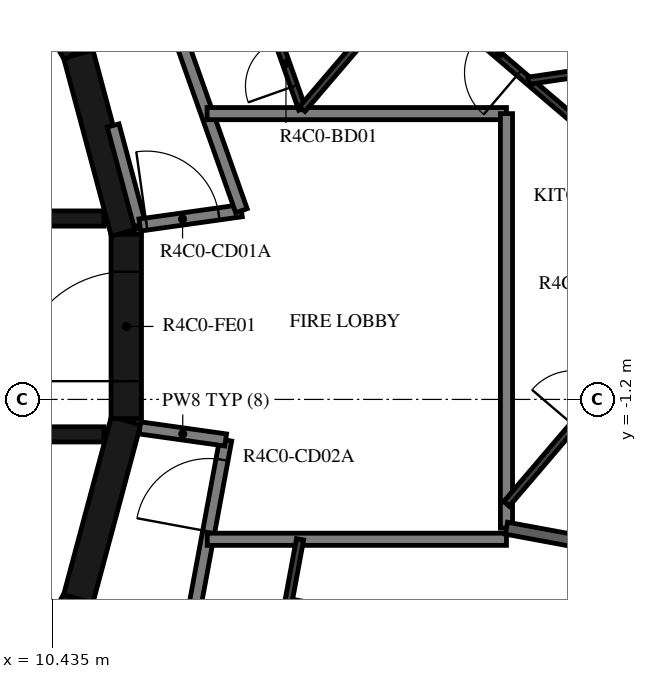
"""IFC4 building model, lengths in metres.
Left out: names, types, materials, properties, quantities, classifications, styles, units other than length and angle.
Written with IfcOpenShell. Run it as: python <this file> out.ifc"""

import sys

from ifc_helpers import new_model, si_unit, direction, frame, frame_2d, origin, place, context, subcontext, project, spatial, rectangle, extrude, element, fill, save


model = new_model("IFC4")
c1 = context("Model", 3, precision=1e-05, world=origin(), true_north=direction((0.0, 1.0)))
c2 = subcontext(c1, "Body", "Model", "MODEL_VIEW")
j1 = project(units=[si_unit("LENGTHUNIT", "METRE"), si_unit("PLANEANGLEUNIT", "RADIAN")], contexts=[c1])
p1 = place(None, origin())
s1 = spatial("IfcSite", under=j1, at=p1, CompositionType="ELEMENT")
p2 = place(p1, origin())
s2 = spatial("IfcBuilding", under=s1, at=p2, CompositionType="ELEMENT")
p3 = place(p2, frame((0.0, 0.0, 179.7)))
s3 = spatial("IfcBuildingStorey", under=s2, at=p3, CompositionType="ELEMENT", Elevation=179.7)
for number, where, z_axis, x_axis in (
    (1, (9.329, -7.137, 0.0), (0.0, 0.0, 1.0), (0.5, 0.866, 0.0)),
    (2, (10.858, -4.479, 0.0), (0.0, 0.0, 1.0), (0.259, 0.966, 0.0)),
):
    element("IfcWall", number, at=place(p3, frame(where, z_axis=z_axis, x_axis=x_axis)), inside=s3, PredefinedType="SHEAR", context=c2, shape_type="SweptSolid", body=[
        extrude(rectangle(XDim=3.033, YDim=0.5, at=frame_2d((1.516, 0.0))), origin(), (0.0, 0.0, 1.0), 3.05),
    ])
p4 = place(p3, frame((11.647, -1.516, 0.0), z_axis=(0.0, 0.0, 1.0), x_axis=(0.0, 1.0, 0.0)))
e3 = element("IfcWall", 3, at=p4, inside=s3, PredefinedType="SHEAR", context=c2, shape_type="SweptSolid", body=[
    extrude(rectangle(XDim=3.033, YDim=0.5, at=frame_2d((1.516, 0.0))), origin(), (0.0, 0.0, 1.0), 3.05),
])
p5 = place(p4, frame((0.616, 0.0, 0.0)))
e4 = element("IfcOpeningElement", 4, at=p5, cuts=e3, PredefinedType="OPENING", context=c2, shape_type="SweptSolid", body=[
    extrude(rectangle(XDim=1.8, YDim=2.1, at=frame_2d((0.9, 1.05))), frame((0.0, 0.26, 0.0), z_axis=(0.0, -1.0, 0.0), x_axis=(1.0, 0.0, 0.0)), (0.0, 0.0, 1.0), 0.52),
])
for number, where, z_axis, x_axis in (
    (5, (11.643, 1.55, 0.0), (0.0, 0.0, 1.0), (-0.259, 0.966, 0.0)),
    (6, (10.845, 4.51, 0.0), (0.0, 0.0, 1.0), (-0.5, 0.866, 0.0)),
):
    element("IfcWall", number, at=place(p3, frame(where, z_axis=z_axis, x_axis=x_axis)), inside=s3, PredefinedType="SHEAR", context=c2, shape_type="SweptSolid", body=[
        extrude(rectangle(XDim=3.033, YDim=0.5, at=frame_2d((1.516, 0.0))), origin(), (0.0, 0.0, 1.0), 3.05),
    ])
p6 = place(p3, frame((3.35, 1.775, 0.0), z_axis=(0.0, 0.0, 1.0), x_axis=(1.0, 0.0, 0.0)))
e7 = element("IfcWall", 7, at=p6, inside=s3, PredefinedType="SHEAR", context=c2, shape_type="SweptSolid", body=[
    extrude(rectangle(XDim=7.93, YDim=0.25, at=frame_2d((3.965, 0.0))), origin(), (0.0, 0.0, 1.0), 3.05),
])
p7 = place(p6, frame((0.35, 0.0, 0.0)))
e8 = element("IfcOpeningElement", 8, at=p7, cuts=e7, PredefinedType="OPENING", context=c2, shape_type="SweptSolid", body=[
    extrude(rectangle(XDim=1.2, YDim=2.4, at=frame_2d((0.6, 1.2))), frame((0.0, 0.135, 0.0), z_axis=(0.0, -1.0, 0.0), x_axis=(1.0, 0.0, 0.0)), (0.0, 0.0, 1.0), 0.27),
])
p8 = place(p6, frame((2.5, 0.0, 0.0)))
e9 = element("IfcOpeningElement", 9, at=p8, cuts=e7, PredefinedType="OPENING", context=c2, shape_type="SweptSolid", body=[
    extrude(rectangle(XDim=1.2, YDim=2.4, at=frame_2d((0.6, 1.2))), frame((0.0, 0.135, 0.0), z_axis=(0.0, -1.0, 0.0), x_axis=(1.0, 0.0, 0.0)), (0.0, 0.0, 1.0), 0.27),
])
p9 = place(p6, frame((4.8, 0.0, 0.0)))
e10 = element("IfcOpeningElement", 10, at=p9, cuts=e7, PredefinedType="OPENING", context=c2, shape_type="SweptSolid", body=[
    extrude(rectangle(XDim=0.9, YDim=2.1, at=frame_2d((0.45, 1.05))), frame((0.0, 0.135, 0.0), z_axis=(0.0, -1.0, 0.0), x_axis=(1.0, 0.0, 0.0)), (0.0, 0.0, 1.0), 0.27),
])
p10 = place(p3, frame((3.35, -1.775, 0.0), z_axis=(0.0, 0.0, 1.0), x_axis=(1.0, 0.0, 0.0)))
e11 = element("IfcWall", 11, at=p10, inside=s3, PredefinedType="SHEAR", context=c2, shape_type="SweptSolid", body=[
    extrude(rectangle(XDim=7.93, YDim=0.25, at=frame_2d((3.965, 0.0))), origin(), (0.0, 0.0, 1.0), 3.05),
])
p11 = place(p10, frame((0.4, 0.0, 0.0)))
e12 = element("IfcOpeningElement", 12, at=p11, cuts=e11, PredefinedType="OPENING", context=c2, shape_type="SweptSolid", body=[
    extrude(rectangle(XDim=1.1, YDim=2.4, at=frame_2d((0.55, 1.2))), frame((0.0, 0.135, 0.0), z_axis=(0.0, -1.0, 0.0), x_axis=(1.0, 0.0, 0.0)), (0.0, 0.0, 1.0), 0.27),
])
p12 = place(p10, frame((2.55, 0.0, 0.0)))
e13 = element("IfcOpeningElement", 13, at=p12, cuts=e11, PredefinedType="OPENING", context=c2, shape_type="SweptSolid", body=[
    extrude(rectangle(XDim=1.1, YDim=2.4, at=frame_2d((0.55, 1.2))), frame((0.0, 0.135, 0.0), z_axis=(0.0, -1.0, 0.0), x_axis=(1.0, 0.0, 0.0)), (0.0, 0.0, 1.0), 0.27),
])
p13 = place(p10, frame((4.7, 0.0, 0.0)))
e14 = element("IfcOpeningElement", 14, at=p13, cuts=e11, PredefinedType="OPENING", context=c2, shape_type="SweptSolid", body=[
    extrude(rectangle(XDim=1.1, YDim=2.4, at=frame_2d((0.55, 1.2))), frame((0.0, 0.135, 0.0), z_axis=(0.0, -1.0, 0.0), x_axis=(1.0, 0.0, 0.0)), (0.0, 0.0, 1.0), 0.27),
])
p14 = place(p3, frame((11.87, 1.668, 0.0), z_axis=(0.0, 0.0, 1.0), x_axis=(-0.258836880648, 0.965921047093, 0.0)))
e15 = element("IfcWall", 15, at=p14, inside=s3, PredefinedType="STANDARD", context=c2, shape_type="SweptSolid", body=[
    extrude(rectangle(XDim=1.695, YDim=0.2, at=frame_2d((0.848, 0.0))), origin(), (0.0, 0.0, 1.0), 3.05),
])
p15 = place(p3, frame((11.87, 1.668, 0.0), z_axis=(0.0, 0.0, 1.0), x_axis=(0.990270910415, 0.139152879904, 0.0)))
e16 = element("IfcWall", 16, at=p15, inside=s3, PredefinedType="STANDARD", context=c2, shape_type="SweptSolid", body=[
    extrude(rectangle(XDim=1.688, YDim=0.2, at=frame_2d((0.844, 0.0))), origin(), (0.0, 0.0, 1.0), 3.05),
])
p16 = place(p15, frame((0.11, 0.0, 0.0)))
e17 = element("IfcOpeningElement", 17, at=p16, cuts=e16, PredefinedType="OPENING", context=c2, shape_type="SweptSolid", body=[
    extrude(rectangle(XDim=1.2, YDim=2.0, at=frame_2d((0.6, 1.0))), frame((0.0, 0.11, 0.0), z_axis=(0.0, -1.0, 0.0), x_axis=(1.0, 0.0, 0.0)), (0.0, 0.0, 1.0), 0.22),
])
p17 = place(p3, frame((13.542, 1.903, 0.0), z_axis=(0.0, 0.0, 1.0), x_axis=(-0.333808508206, 0.942640907159, 0.0)))
e18 = element("IfcWall", 18, at=p17, inside=s3, PredefinedType="STANDARD", context=c2, shape_type="SweptSolid", body=[
    extrude(rectangle(XDim=6.317, YDim=0.2, at=frame_2d((3.158, 0.0))), origin(), (0.0, 0.0, 1.0), 3.05),
])
p18 = place(p3, frame((12.521, -5.972, 0.0), z_axis=(0.0, 0.0, 1.0), x_axis=(0.182244189886, 0.983253301674, 0.0)))
e19 = element("IfcWall", 19, at=p18, inside=s3, PredefinedType="STANDARD", context=c2, shape_type="SweptSolid", body=[
    extrude(rectangle(XDim=4.176, YDim=0.2, at=frame_2d((2.088, 0.0))), origin(), (0.0, 0.0, 1.0), 3.05),
])
p19 = place(p18, frame((2.645, 0.0, 0.0)))
e20 = element("IfcOpeningElement", 20, at=p19, cuts=e19, PredefinedType="OPENING", context=c2, shape_type="SweptSolid", body=[
    extrude(rectangle(XDim=1.2, YDim=2.0, at=frame_2d((0.6, 1.0))), frame((0.0, 0.11, 0.0), z_axis=(0.0, -1.0, 0.0), x_axis=(1.0, 0.0, 0.0)), (0.0, 0.0, 1.0), 0.22),
])
p20 = place(p3, frame((13.282, -1.867, 0.0), z_axis=(0.0, 0.0, 1.0), x_axis=(-0.990265430288, 0.139191873241, 0.0)))
e21 = element("IfcWall", 21, at=p20, inside=s3, PredefinedType="STANDARD", context=c2, shape_type="SweptSolid", body=[
    extrude(rectangle(XDim=1.426, YDim=0.2, at=frame_2d((0.713, 0.0))), origin(), (0.0, 0.0, 1.0), 3.05),
])
p21 = place(p3, frame((17.9, 3.5, 0.0), z_axis=(0.0, 0.0, 1.0), x_axis=(-1.0, 0.0, 0.0)))
e22 = element("IfcWall", 22, at=p21, inside=s3, PredefinedType="STANDARD", context=c2, shape_type="SweptSolid", body=[
    extrude(rectangle(XDim=4.924, YDim=0.2, at=frame_2d((2.462, 0.0))), origin(), (0.0, 0.0, 1.0), 3.05),
])
p22 = place(p3, frame((17.9, -3.318, 0.0), z_axis=(0.0, 0.0, 1.0), x_axis=(0.0, 1.0, 0.0)))
e23 = element("IfcWall", 23, at=p22, inside=s3, PredefinedType="STANDARD", context=c2, shape_type="SweptSolid", body=[
    extrude(rectangle(XDim=6.818, YDim=0.2, at=frame_2d((3.409, 0.0))), origin(), (0.0, 0.0, 1.0), 3.05),
])
p23 = place(p3, frame((12.979, -3.5, 0.0), z_axis=(0.0, 0.0, 1.0), x_axis=(1.0, 0.0, 0.0)))
e24 = element("IfcWall", 24, at=p23, inside=s3, PredefinedType="STANDARD", context=c2, shape_type="SweptSolid", body=[
    extrude(rectangle(XDim=4.92, YDim=0.2, at=frame_2d((2.46, 0.0))), origin(), (0.0, 0.0, 1.0), 3.05),
])
p24 = place(p3, frame((17.9, -3.318, 0.0), z_axis=(0.0, 0.0, 1.0), x_axis=(0.983252800712, -0.182246892682, 0.0)))
e25 = element("IfcWall", 25, at=p24, inside=s3, PredefinedType="STANDARD", context=c2, shape_type="SweptSolid", body=[
    extrude(rectangle(XDim=1.386, YDim=0.2, at=frame_2d((0.693, 0.0))), origin(), (0.0, 0.0, 1.0), 3.05),
])
p25 = place(p3, frame((14.541, 3.575, 0.0), z_axis=(0.0, 0.0, 1.0), x_axis=(-0.333799280318, 0.942644174893, 0.0)))
e26 = element("IfcWall", 26, at=p25, inside=s3, PredefinedType="PARTITIONING", context=c2, shape_type="SweptSolid", body=[
    extrude(rectangle(XDim=5.477, YDim=0.12, at=frame_2d((2.738, 0.0))), origin(), (0.0, 0.0, 1.0), 3.05),
])
p26 = place(p25, frame((0.4, 0.0, 0.0)))
e27 = element("IfcOpeningElement", 27, at=p26, cuts=e26, PredefinedType="OPENING", context=c2, shape_type="SweptSolid", body=[
    extrude(rectangle(XDim=0.8, YDim=2.1, at=frame_2d((0.4, 1.05))), frame((0.0, 0.07, 0.0), z_axis=(0.0, -1.0, 0.0), x_axis=(1.0, 0.0, 0.0)), (0.0, 0.0, 1.0), 0.14),
])
p27 = place(p3, frame((23.411, -0.357, 0.0), z_axis=(0.0, 0.0, 1.0), x_axis=(-0.76041871148, 0.649433124525, 0.0)))
e28 = element("IfcWall", 28, at=p27, inside=s3, PredefinedType="PARTITIONING", context=c2, shape_type="SweptSolid", body=[
    extrude(rectangle(XDim=9.259, YDim=0.12, at=frame_2d((4.629, 0.0))), origin(), (0.0, 0.0, 1.0), 3.05),
])
p28 = place(p27, frame((6.972, 0.0, 0.0)))
e29 = element("IfcOpeningElement", 29, at=p28, cuts=e28, PredefinedType="OPENING", context=c2, shape_type="SweptSolid", body=[
    extrude(rectangle(XDim=0.9, YDim=2.1, at=frame_2d((0.45, 1.05))), frame((0.0, 0.07, 0.0), z_axis=(0.0, -1.0, 0.0), x_axis=(1.0, 0.0, 0.0)), (0.0, 0.0, 1.0), 0.14),
])
p29 = place(p27, frame((0.2, 0.0, 0.0)))
e30 = element("IfcOpeningElement", 30, at=p29, cuts=e28, PredefinedType="OPENING", context=c2, shape_type="SweptSolid", body=[
    extrude(rectangle(XDim=0.9, YDim=2.1, at=frame_2d((0.45, 1.05))), frame((0.0, 0.07, 0.0), z_axis=(0.0, -1.0, 0.0), x_axis=(1.0, 0.0, 0.0)), (0.0, 0.0, 1.0), 0.14),
])
p30 = place(p3, frame((16.341, 5.682, 0.0), z_axis=(0.0, 0.0, 1.0), x_axis=(-0.64946993237, -0.76038727432, 0.0)))
e31 = element("IfcWall", 31, at=p30, inside=s3, PredefinedType="PARTITIONING", context=c2, shape_type="SweptSolid", body=[
    extrude(rectangle(XDim=2.771, YDim=0.12, at=frame_2d((1.386, 0.0))), origin(), (0.0, 0.0, 1.0), 3.05),
])
p31 = place(p3, frame((17.9, -2.918, 0.0), z_axis=(0.0, 0.0, 1.0), x_axis=(0.649469887983, 0.760387312232, 0.0)))
e32 = element("IfcWall", 32, at=p31, inside=s3, PredefinedType="PARTITIONING", context=c2, shape_type="SweptSolid", body=[
    extrude(rectangle(XDim=5.527, YDim=0.12, at=frame_2d((2.763, 0.0))), origin(), (0.0, 0.0, 1.0), 3.05),
])
p32 = place(p31, frame((1.7, 0.0, 0.0)))
e33 = element("IfcOpeningElement", 33, at=p32, cuts=e32, PredefinedType="OPENING", context=c2, shape_type="SweptSolid", body=[
    extrude(rectangle(XDim=0.9, YDim=2.0, at=frame_2d((0.45, 1.0))), frame((0.0, 0.07, 0.0), z_axis=(0.0, -1.0, 0.0), x_axis=(1.0, 0.0, 0.0)), (0.0, 0.0, 1.0), 0.14),
])
p33 = place(p3, frame((22.994, 4.734, 0.0), z_axis=(0.0, 0.0, 1.0), x_axis=(-0.989449286977, -0.144879634529, 0.0)))
e34 = element("IfcWall", 34, at=p33, inside=s3, PredefinedType="PARTITIONING", context=c2, shape_type="SweptSolid", body=[
    extrude(rectangle(XDim=4.782, YDim=0.12, at=frame_2d((2.391, 0.0))), origin(), (0.0, 0.0, 1.0), 3.05),
])
p34 = place(p33, frame((0.7, 0.0, 0.0)))
e35 = element("IfcOpeningElement", 35, at=p34, cuts=e34, PredefinedType="OPENING", context=c2, shape_type="SweptSolid", body=[
    extrude(rectangle(XDim=0.9, YDim=2.1, at=frame_2d((0.45, 1.05))), frame((0.0, 0.07, 0.0), z_axis=(0.0, -1.0, 0.0), x_axis=(1.0, 0.0, 0.0)), (0.0, 0.0, 1.0), 0.14),
])
p35 = place(p3, frame((18.507, -5.312, 0.0), z_axis=(0.0, 0.0, 1.0), x_axis=(-0.983254286603, 0.182238875868, 0.0)))
e36 = element("IfcWall", 36, at=p35, inside=s3, PredefinedType="PARTITIONING", context=c2, shape_type="SweptSolid", body=[
    extrude(rectangle(XDim=4.266, YDim=0.12, at=frame_2d((2.133, 0.0))), origin(), (0.0, 0.0, 1.0), 3.05),
])
p36 = place(p3, frame((14.313, -4.535, 0.0), z_axis=(0.0, 0.0, 1.0), x_axis=(0.182271946033, 0.983248156718, 0.0)))
e37 = element("IfcWall", 37, at=p36, inside=s3, PredefinedType="PARTITIONING", context=c2, shape_type="SweptSolid", body=[
    extrude(rectangle(XDim=1.053, YDim=0.12, at=frame_2d((0.526, 0.0))), origin(), (0.0, 0.0, 1.0), 3.05),
])
p37 = place(p5, origin())
e38 = element("IfcDoor", 38, at=p37, inside=s3, OperationType="DOUBLE_DOOR_SINGLE_SWING", PredefinedType="DOOR", context=c2, shape_type="SweptSolid", body=[
    extrude(rectangle(XDim=1.8, YDim=2.1, at=frame_2d((0.9, 1.05))), frame((0.0, 0.025, 0.0), z_axis=(0.0, -1.0, 0.0), x_axis=(1.0, 0.0, 0.0)), (0.0, 0.0, 1.0), 0.05),
])
fill(e4, e38)
p38 = place(p26, origin())
e39 = element("IfcDoor", 39, at=p38, inside=s3, OperationType="SINGLE_SWING_LEFT", PredefinedType="DOOR", context=c2, shape_type="SweptSolid", body=[
    extrude(rectangle(XDim=0.8, YDim=2.1, at=frame_2d((0.4, 1.05))), frame((0.0, 0.025, 0.0), z_axis=(0.0, -1.0, 0.0), x_axis=(1.0, 0.0, 0.0)), (0.0, 0.0, 1.0), 0.05),
])
fill(e27, e39)
p39 = place(p28, origin())
e40 = element("IfcDoor", 40, at=p39, inside=s3, OperationType="SINGLE_SWING_RIGHT", PredefinedType="DOOR", context=c2, shape_type="SweptSolid", body=[
    extrude(rectangle(XDim=0.9, YDim=2.1, at=frame_2d((0.45, 1.05))), frame((0.0, 0.025, 0.0), z_axis=(0.0, -1.0, 0.0), x_axis=(1.0, 0.0, 0.0)), (0.0, 0.0, 1.0), 0.05),
])
fill(e29, e40)
p40 = place(p16, origin())
e41 = element("IfcDoor", 41, at=p40, inside=s3, OperationType="DOUBLE_DOOR_SINGLE_SWING", PredefinedType="DOOR", context=c2, shape_type="SweptSolid", body=[
    extrude(rectangle(XDim=1.2, YDim=2.0, at=frame_2d((0.6, 1.0))), frame((0.0, 0.025, 0.0), z_axis=(0.0, -1.0, 0.0), x_axis=(1.0, 0.0, 0.0)), (0.0, 0.0, 1.0), 0.05),
])
fill(e17, e41)
p41 = place(p19, origin())
e42 = element("IfcDoor", 42, at=p41, inside=s3, OperationType="DOUBLE_DOOR_SINGLE_SWING", PredefinedType="DOOR", context=c2, shape_type="SweptSolid", body=[
    extrude(rectangle(XDim=1.2, YDim=2.0, at=frame_2d((0.6, 1.0))), frame((0.0, 0.025, 0.0), z_axis=(0.0, -1.0, 0.0), x_axis=(1.0, 0.0, 0.0)), (0.0, 0.0, 1.0), 0.05),
])
fill(e20, e42)
save(model, sys.argv[1])
